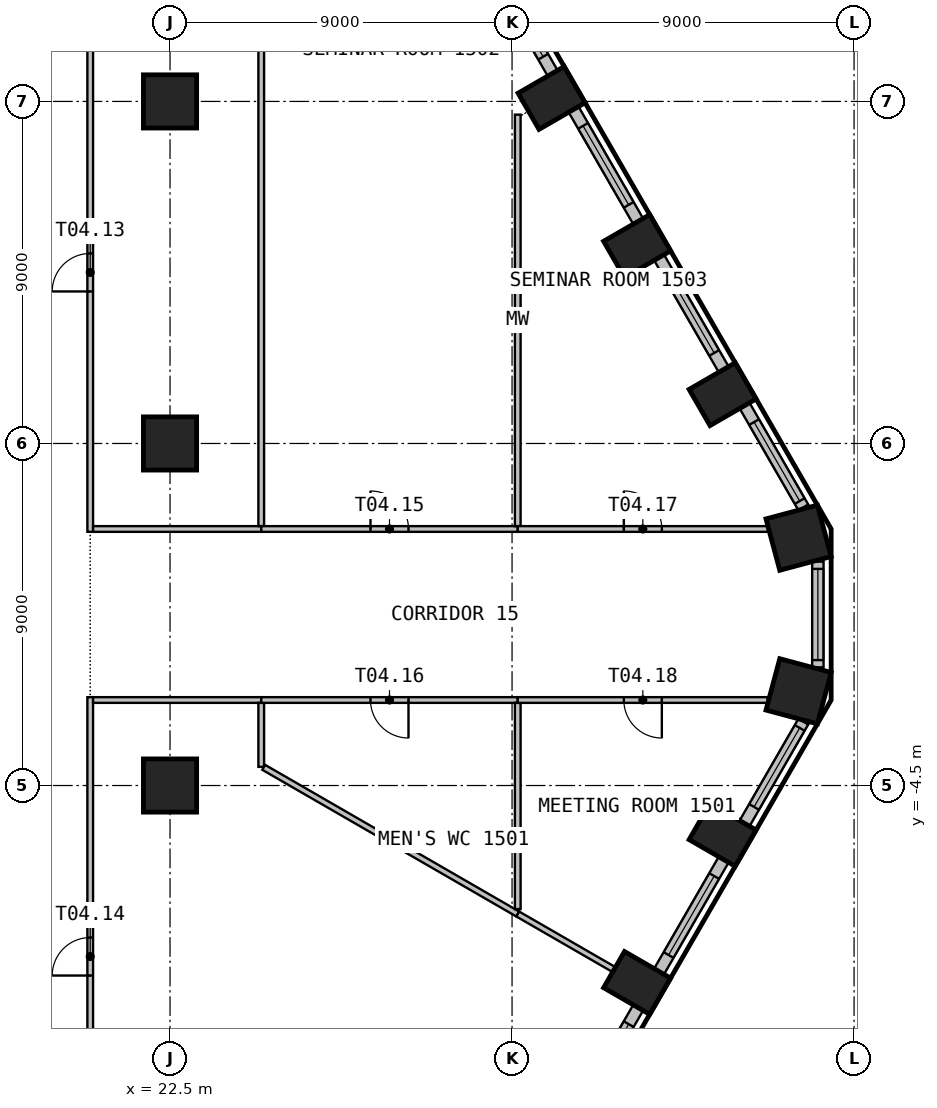
"""IFC4 building model, lengths in metres.
Left out: names, types, materials, properties, quantities, classifications, styles, units other than length and angle.
Written with IfcOpenShell. Run it as: python <this file> out.ifc"""

import sys

from ifc_helpers import new_model, si_unit, direction, frame, frame_2d, origin, origin_2d, place, context, subcontext, project, spatial, rectangle, circle, extrude, element, fill, save


model = new_model("IFC4")
c1 = context("Model", 3, precision=1e-05, world=origin(), true_north=direction((0.0, 1.0)))
c2 = subcontext(c1, "Body", "Model", "MODEL_VIEW")
j1 = project(units=[si_unit("LENGTHUNIT", "METRE"), si_unit("PLANEANGLEUNIT", "RADIAN")], contexts=[c1])
p1 = place(None, origin())
s1 = spatial("IfcSite", under=j1, at=p1, CompositionType="ELEMENT")
p2 = place(p1, origin())
s2 = spatial("IfcBuilding", under=s1, at=p2, CompositionType="ELEMENT")
p3 = place(p2, frame((0.0, 0.0, 65.1)))
s3 = spatial("IfcBuildingStorey", under=s2, at=p3, CompositionType="ELEMENT", Elevation=65.1)
for number, where, z_axis, x_axis in (
    (1, (34.791, -9.694, 0.0), (0.0, 0.0, 1.0), (0.5, 0.866, 0.0)),
    (2, (37.041, -5.797, 0.0), (0.0, 0.0, 1.0), (0.5, 0.866, 0.0)),
):
    element("IfcColumn", number, at=place(p3, frame(where, z_axis=z_axis, x_axis=x_axis)), inside=s3, PredefinedType="COLUMN", context=c2, shape_type="SweptSolid", body=[
        extrude(rectangle(XDim=1.1, YDim=1.4, at=origin_2d()), origin(), (0.0, 0.0, 1.0), 3.525),
    ])
for number, where, z_axis, x_axis in (
    (3, (39.04, -2.02, 0.0), (0.0, 0.0, 1.0), (0.259, 0.966, 0.0)),
    (4, (39.04, 2.02, 0.0), (0.0, 0.0, 1.0), (-0.259, 0.966, 0.0)),
):
    element("IfcColumn", number, at=place(p3, frame(where, z_axis=z_axis, x_axis=x_axis)), inside=s3, PredefinedType="COLUMN", context=c2, shape_type="SweptSolid", body=[
        extrude(rectangle(XDim=1.4, YDim=1.4, at=origin_2d()), origin(), (0.0, 0.0, 1.0), 3.525),
    ])
for number, where, z_axis, x_axis in (
    (5, (37.041, 5.797, 0.0), (0.0, 0.0, 1.0), (-0.5, 0.866, 0.0)),
    (6, (34.791, 9.694, 0.0), (0.0, 0.0, 1.0), (-0.5, 0.866, 0.0)),
    (7, (32.541, 13.591, 0.0), (0.0, 0.0, 1.0), (-0.5, 0.866, 0.0)),
):
    element("IfcColumn", number, at=place(p3, frame(where, z_axis=z_axis, x_axis=x_axis)), inside=s3, PredefinedType="COLUMN", context=c2, shape_type="SweptSolid", body=[
        extrude(rectangle(XDim=1.1, YDim=1.4, at=origin_2d()), origin(), (0.0, 0.0, 1.0), 3.525),
    ])
for number, where, z_axis, x_axis in (
    (8, (22.5, -4.5, 0.0), (0.0, 0.0, 1.0), (1.0, 0.0, 0.0)),
    (9, (22.5, 4.5, 0.0), (0.0, 0.0, 1.0), (1.0, 0.0, 0.0)),
    (10, (22.5, 13.5, 0.0), (0.0, 0.0, 1.0), (1.0, 0.0, 0.0)),
):
    element("IfcColumn", number, at=place(p3, frame(where, z_axis=z_axis, x_axis=x_axis)), inside=s3, PredefinedType="COLUMN", context=c2, shape_type="SweptSolid", body=[
        extrude(circle(Radius=0.7, at=origin_2d()), origin(), (0.0, 0.0, 1.0), 3.525),
    ])
p4 = place(p3, frame((33.119, -13.29, 0.0), z_axis=(0.0, 0.0, 1.0), x_axis=(0.499993955907, 0.866028893315, 0.0)))
e11 = element("IfcWall", 11, at=p4, inside=s3, PredefinedType="SOLIDWALL", context=c2, shape_type="SweptSolid", body=[
    extrude(rectangle(XDim=3.399, YDim=0.3, at=frame_2d((1.699, 0.0))), origin(), (0.0, 0.0, 1.0), 3.525),
])
p5 = place(p4, frame((0.5, 0.0, 0.9)))
e12 = element("IfcOpeningElement", 12, at=p5, cuts=e11, PredefinedType="OPENING", context=c2, shape_type="SweptSolid", body=[
    extrude(rectangle(XDim=2.4, YDim=2.1, at=frame_2d((1.2, 1.05))), frame((0.0, 0.16, 0.0), z_axis=(0.0, -1.0, 0.0), x_axis=(1.0, 0.0, 0.0)), (0.0, 0.0, 1.0), 0.32),
])
p6 = place(p3, frame((35.369, -9.393, 0.0), z_axis=(0.0, 0.0, 1.0), x_axis=(0.499993955907, 0.866028893315, 0.0)))
e13 = element("IfcWall", 13, at=p6, inside=s3, PredefinedType="SOLIDWALL", context=c2, shape_type="SweptSolid", body=[
    extrude(rectangle(XDim=3.399, YDim=0.3, at=frame_2d((1.699, 0.0))), origin(), (0.0, 0.0, 1.0), 3.525),
])
p7 = place(p6, frame((0.5, 0.0, 0.9)))
e14 = element("IfcOpeningElement", 14, at=p7, cuts=e13, PredefinedType="OPENING", context=c2, shape_type="SweptSolid", body=[
    extrude(rectangle(XDim=2.4, YDim=2.1, at=frame_2d((1.2, 1.05))), frame((0.0, 0.16, 0.0), z_axis=(0.0, -1.0, 0.0), x_axis=(1.0, 0.0, 0.0)), (0.0, 0.0, 1.0), 0.32),
])
p8 = place(p3, frame((37.619, -5.495, 0.0), z_axis=(0.0, 0.0, 1.0), x_axis=(0.49997090907, 0.866042198789, 0.0)))
e15 = element("IfcWall", 15, at=p8, inside=s3, PredefinedType="SOLIDWALL", context=c2, shape_type="SweptSolid", body=[
    extrude(rectangle(XDim=3.091, YDim=0.3, at=frame_2d((1.545, 0.0))), origin(), (0.0, 0.0, 1.0), 3.525),
])
p9 = place(p8, frame((0.5, 0.0, 0.9)))
e16 = element("IfcOpeningElement", 16, at=p9, cuts=e15, PredefinedType="OPENING", context=c2, shape_type="SweptSolid", body=[
    extrude(rectangle(XDim=2.4, YDim=2.1, at=frame_2d((1.2, 1.05))), frame((0.0, 0.16, 0.0), z_axis=(0.0, -1.0, 0.0), x_axis=(1.0, 0.0, 0.0)), (0.0, 0.0, 1.0), 0.32),
])
p10 = place(p3, frame((39.547, -1.391, 0.0), z_axis=(0.0, 0.0, 1.0), x_axis=(0.0, 1.0, 0.0)))
e17 = element("IfcWall", 17, at=p10, inside=s3, PredefinedType="SOLIDWALL", context=c2, shape_type="SweptSolid", body=[
    extrude(rectangle(XDim=2.782, YDim=0.3, at=frame_2d((1.391, 0.0))), origin(), (0.0, 0.0, 1.0), 3.525),
])
p11 = place(p10, frame((0.191, 0.0, 0.9)))
e18 = element("IfcOpeningElement", 18, at=p11, cuts=e17, PredefinedType="OPENING", context=c2, shape_type="SweptSolid", body=[
    extrude(rectangle(XDim=2.4, YDim=2.1, at=frame_2d((1.2, 1.05))), frame((0.0, 0.16, 0.0), z_axis=(0.0, -1.0, 0.0), x_axis=(1.0, 0.0, 0.0)), (0.0, 0.0, 1.0), 0.32),
])
p12 = place(p3, frame((39.165, 2.819, 0.0), z_axis=(0.0, 0.0, 1.0), x_axis=(-0.49997090907, 0.866042198789, 0.0)))
e19 = element("IfcWall", 19, at=p12, inside=s3, PredefinedType="SOLIDWALL", context=c2, shape_type="SweptSolid", body=[
    extrude(rectangle(XDim=3.091, YDim=0.3, at=frame_2d((1.545, 0.0))), origin(), (0.0, 0.0, 1.0), 3.525),
])
p13 = place(p12, frame((0.191, 0.0, 0.9)))
e20 = element("IfcOpeningElement", 20, at=p13, cuts=e19, PredefinedType="OPENING", context=c2, shape_type="SweptSolid", body=[
    extrude(rectangle(XDim=2.4, YDim=2.1, at=frame_2d((1.2, 1.05))), frame((0.0, 0.16, 0.0), z_axis=(0.0, -1.0, 0.0), x_axis=(1.0, 0.0, 0.0)), (0.0, 0.0, 1.0), 0.32),
])
p14 = place(p3, frame((37.069, 6.449, 0.0), z_axis=(0.0, 0.0, 1.0), x_axis=(-0.499993955907, 0.866028893315, 0.0)))
e21 = element("IfcWall", 21, at=p14, inside=s3, PredefinedType="SOLIDWALL", context=c2, shape_type="SweptSolid", body=[
    extrude(rectangle(XDim=3.399, YDim=0.3, at=frame_2d((1.699, 0.0))), origin(), (0.0, 0.0, 1.0), 3.525),
])
p15 = place(p14, frame((0.5, 0.0, 0.9)))
e22 = element("IfcOpeningElement", 22, at=p15, cuts=e21, PredefinedType="OPENING", context=c2, shape_type="SweptSolid", body=[
    extrude(rectangle(XDim=2.4, YDim=2.1, at=frame_2d((1.2, 1.05))), frame((0.0, 0.16, 0.0), z_axis=(0.0, -1.0, 0.0), x_axis=(1.0, 0.0, 0.0)), (0.0, 0.0, 1.0), 0.32),
])
p16 = place(p3, frame((34.819, 10.346, 0.0), z_axis=(0.0, 0.0, 1.0), x_axis=(-0.499993955907, 0.866028893315, 0.0)))
e23 = element("IfcWall", 23, at=p16, inside=s3, PredefinedType="SOLIDWALL", context=c2, shape_type="SweptSolid", body=[
    extrude(rectangle(XDim=3.399, YDim=0.3, at=frame_2d((1.699, 0.0))), origin(), (0.0, 0.0, 1.0), 3.525),
])
p17 = place(p16, frame((0.5, 0.0, 0.9)))
e24 = element("IfcOpeningElement", 24, at=p17, cuts=e23, PredefinedType="OPENING", context=c2, shape_type="SweptSolid", body=[
    extrude(rectangle(XDim=2.4, YDim=2.1, at=frame_2d((1.2, 1.05))), frame((0.0, 0.16, 0.0), z_axis=(0.0, -1.0, 0.0), x_axis=(1.0, 0.0, 0.0)), (0.0, 0.0, 1.0), 0.32),
])
p18 = place(p3, frame((32.569, 14.243, 0.0), z_axis=(0.0, 0.0, 1.0), x_axis=(-0.499993955907, 0.866028893315, 0.0)))
e25 = element("IfcWall", 25, at=p18, inside=s3, PredefinedType="SOLIDWALL", context=c2, shape_type="SweptSolid", body=[
    extrude(rectangle(XDim=3.399, YDim=0.3, at=frame_2d((1.699, 0.0))), origin(), (0.0, 0.0, 1.0), 3.525),
])
p19 = place(p18, frame((0.5, 0.0, 0.9)))
e26 = element("IfcOpeningElement", 26, at=p19, cuts=e25, PredefinedType="OPENING", context=c2, shape_type="SweptSolid", body=[
    extrude(rectangle(XDim=2.4, YDim=2.1, at=frame_2d((1.2, 1.05))), frame((0.0, 0.16, 0.0), z_axis=(0.0, -1.0, 0.0), x_axis=(1.0, 0.0, 0.0)), (0.0, 0.0, 1.0), 0.32),
])
p20 = place(p3, frame((20.4, -15.825, 0.0), z_axis=(0.0, 0.0, 1.0), x_axis=(0.0, 1.0, 0.0)))
e27 = element("IfcWall", 27, at=p20, inside=s3, PredefinedType="PARTITIONING", context=c2, shape_type="SweptSolid", body=[
    extrude(rectangle(XDim=13.65, YDim=0.15, at=frame_2d((6.825, 0.0))), origin(), (0.0, 0.0, 1.0), 3.525),
])
p21 = place(p20, frame((6.325, 0.0, 0.0)))
e28 = element("IfcOpeningElement", 28, at=p21, cuts=e27, PredefinedType="OPENING", context=c2, shape_type="SweptSolid", body=[
    extrude(rectangle(XDim=1.0, YDim=2.1, at=frame_2d((0.5, 1.05))), frame((0.0, 0.085, 0.0), z_axis=(0.0, -1.0, 0.0), x_axis=(1.0, 0.0, 0.0)), (0.0, 0.0, 1.0), 0.17),
])
p22 = place(p3, frame((24.9, -2.25, 0.0), z_axis=(0.0, 0.0, 1.0), x_axis=(-1.0, 0.0, 0.0)))
e29 = element("IfcWall", 29, at=p22, inside=s3, PredefinedType="PARTITIONING", context=c2, shape_type="SweptSolid", body=[
    extrude(rectangle(XDim=4.425, YDim=0.15, at=frame_2d((2.212, 0.0))), origin(), (0.0, 0.0, 1.0), 3.525),
])
p23 = place(p3, frame((20.4, 2.175, 0.0), z_axis=(0.0, 0.0, 1.0), x_axis=(0.0, 1.0, 0.0)))
e30 = element("IfcWall", 30, at=p23, inside=s3, PredefinedType="PARTITIONING", context=c2, shape_type="SweptSolid", body=[
    extrude(rectangle(XDim=13.65, YDim=0.15, at=frame_2d((6.825, 0.0))), origin(), (0.0, 0.0, 1.0), 3.525),
])
p24 = place(p23, frame((6.325, 0.0, 0.0)))
e31 = element("IfcOpeningElement", 31, at=p24, cuts=e30, PredefinedType="OPENING", context=c2, shape_type="SweptSolid", body=[
    extrude(rectangle(XDim=1.0, YDim=2.1, at=frame_2d((0.5, 1.05))), frame((0.0, 0.085, 0.0), z_axis=(0.0, -1.0, 0.0), x_axis=(1.0, 0.0, 0.0)), (0.0, 0.0, 1.0), 0.17),
])
p25 = place(p3, frame((20.475, 2.25, 0.0), z_axis=(0.0, 0.0, 1.0), x_axis=(1.0, 0.0, 0.0)))
e32 = element("IfcWall", 32, at=p25, inside=s3, PredefinedType="PARTITIONING", context=c2, shape_type="SweptSolid", body=[
    extrude(rectangle(XDim=4.425, YDim=0.15, at=frame_2d((2.212, 0.0))), origin(), (0.0, 0.0, 1.0), 3.525),
])
p26 = place(p3, frame((24.9, -2.325, 0.0), z_axis=(0.0, 0.0, 1.0), x_axis=(0.0, -1.0, 0.0)))
e33 = element("IfcWall", 33, at=p26, inside=s3, PredefinedType="PARTITIONING", context=c2, shape_type="SweptSolid", body=[
    extrude(rectangle(XDim=1.684, YDim=0.15, at=frame_2d((0.842, 0.0))), origin(), (0.0, 0.0, 1.0), 3.525),
])
p27 = place(p3, frame((24.965, -4.021, 0.0), z_axis=(0.0, 0.0, 1.0), x_axis=(0.866017566024, -0.500013575153, 0.0)))
e34 = element("IfcWall", 34, at=p27, inside=s3, PredefinedType="PARTITIONING", context=c2, shape_type="SweptSolid", body=[
    extrude(rectangle(XDim=7.719, YDim=0.15, at=frame_2d((3.859, 0.0))), origin(), (0.0, 0.0, 1.0), 3.525),
])
p28 = place(p3, frame((31.65, -2.25, 0.0), z_axis=(0.0, 0.0, 1.0), x_axis=(-1.0, 0.0, 0.0)))
e35 = element("IfcWall", 35, at=p28, inside=s3, PredefinedType="PARTITIONING", context=c2, shape_type="SweptSolid", body=[
    extrude(rectangle(XDim=6.75, YDim=0.15, at=frame_2d((3.375, 0.0))), origin(), (0.0, 0.0, 1.0), 3.525),
])
p29 = place(p28, frame((2.875, 0.0, 0.0)))
e36 = element("IfcOpeningElement", 36, at=p29, cuts=e35, PredefinedType="OPENING", context=c2, shape_type="SweptSolid", body=[
    extrude(rectangle(XDim=1.0, YDim=2.1, at=frame_2d((0.5, 1.05))), frame((0.0, 0.085, 0.0), z_axis=(0.0, -1.0, 0.0), x_axis=(1.0, 0.0, 0.0)), (0.0, 0.0, 1.0), 0.17),
])
p30 = place(p3, frame((24.9, 24.843, 0.0), z_axis=(0.0, 0.0, 1.0), x_axis=(0.0, -1.0, 0.0)))
e37 = element("IfcWall", 37, at=p30, inside=s3, PredefinedType="PARTITIONING", context=c2, shape_type="SweptSolid", body=[
    extrude(rectangle(XDim=22.518, YDim=0.15, at=frame_2d((11.259, 0.0))), origin(), (0.0, 0.0, 1.0), 3.525),
])
p31 = place(p3, frame((24.9, 2.25, 0.0), z_axis=(0.0, 0.0, 1.0), x_axis=(1.0, 0.0, 0.0)))
e38 = element("IfcWall", 38, at=p31, inside=s3, PredefinedType="PARTITIONING", context=c2, shape_type="SweptSolid", body=[
    extrude(rectangle(XDim=6.75, YDim=0.15, at=frame_2d((3.375, 0.0))), origin(), (0.0, 0.0, 1.0), 3.525),
])
p32 = place(p31, frame((2.875, 0.0, 0.0)))
e39 = element("IfcOpeningElement", 39, at=p32, cuts=e38, PredefinedType="OPENING", context=c2, shape_type="SweptSolid", body=[
    extrude(rectangle(XDim=1.0, YDim=2.1, at=frame_2d((0.5, 1.05))), frame((0.0, 0.085, 0.0), z_axis=(0.0, -1.0, 0.0), x_axis=(1.0, 0.0, 0.0)), (0.0, 0.0, 1.0), 0.17),
])
p33 = place(p3, frame((31.65, -2.325, 0.0), z_axis=(0.0, 0.0, 1.0), x_axis=(0.0, -1.0, 0.0)))
e40 = element("IfcWall", 40, at=p33, inside=s3, PredefinedType="PARTITIONING", context=c2, shape_type="SweptSolid", body=[
    extrude(rectangle(XDim=5.426, YDim=0.15, at=frame_2d((2.713, 0.0))), origin(), (0.0, 0.0, 1.0), 3.525),
])
p34 = place(p3, frame((31.65, -7.881, 0.0), z_axis=(0.0, 0.0, 1.0), x_axis=(0.866063904005, -0.499933309731, 0.0)))
e41 = element("IfcWall", 41, at=p34, inside=s3, PredefinedType="PARTITIONING", context=c2, shape_type="SweptSolid", body=[
    extrude(rectangle(XDim=2.907, YDim=0.15, at=frame_2d((1.453, 0.0))), origin(), (0.0, 0.0, 1.0), 3.525),
])
p35 = place(p3, frame((38.233, -2.25, 0.0), z_axis=(0.0, 0.0, 1.0), x_axis=(-1.0, 0.0, 0.0)))
e42 = element("IfcWall", 42, at=p35, inside=s3, PredefinedType="PARTITIONING", context=c2, shape_type="SweptSolid", body=[
    extrude(rectangle(XDim=6.583, YDim=0.15, at=frame_2d((3.292, 0.0))), origin(), (0.0, 0.0, 1.0), 3.525),
])
p36 = place(p35, frame((2.792, 0.0, 0.0)))
e43 = element("IfcOpeningElement", 43, at=p36, cuts=e42, PredefinedType="OPENING", context=c2, shape_type="SweptSolid", body=[
    extrude(rectangle(XDim=1.0, YDim=2.1, at=frame_2d((0.5, 1.05))), frame((0.0, 0.085, 0.0), z_axis=(0.0, -1.0, 0.0), x_axis=(1.0, 0.0, 0.0)), (0.0, 0.0, 1.0), 0.17),
])
p37 = place(p3, frame((31.65, 13.152, 0.0), z_axis=(0.0, 0.0, 1.0), x_axis=(0.0, -1.0, 0.0)))
e44 = element("IfcWall", 44, at=p37, inside=s3, PredefinedType="MOVABLE", context=c2, shape_type="SweptSolid", body=[
    extrude(rectangle(XDim=10.827, YDim=0.15, at=frame_2d((5.414, 0.0))), origin(), (0.0, 0.0, 1.0), 3.525),
])
p38 = place(p3, frame((31.65, 2.25, 0.0), z_axis=(0.0, 0.0, 1.0), x_axis=(1.0, 0.0, 0.0)))
e45 = element("IfcWall", 45, at=p38, inside=s3, PredefinedType="PARTITIONING", context=c2, shape_type="SweptSolid", body=[
    extrude(rectangle(XDim=6.583, YDim=0.15, at=frame_2d((3.292, 0.0))), origin(), (0.0, 0.0, 1.0), 3.525),
])
p39 = place(p38, frame((2.792, 0.0, 0.0)))
e46 = element("IfcOpeningElement", 46, at=p39, cuts=e45, PredefinedType="OPENING", context=c2, shape_type="SweptSolid", body=[
    extrude(rectangle(XDim=1.0, YDim=2.1, at=frame_2d((0.5, 1.05))), frame((0.0, 0.085, 0.0), z_axis=(0.0, -1.0, 0.0), x_axis=(1.0, 0.0, 0.0)), (0.0, 0.0, 1.0), 0.17),
])
p40 = place(p5, origin())
e47 = element("IfcWindow", 47, at=p40, inside=s3, PartitioningType="SINGLE_PANEL", PredefinedType="WINDOW", context=c2, shape_type="SweptSolid", body=[
    extrude(rectangle(XDim=2.4, YDim=2.1, at=frame_2d((1.2, 1.05))), frame((0.0, 0.03, 0.0), z_axis=(0.0, -1.0, 0.0), x_axis=(1.0, 0.0, 0.0)), (0.0, 0.0, 1.0), 0.06),
])
fill(e12, e47)
p41 = place(p7, origin())
e48 = element("IfcWindow", 48, at=p41, inside=s3, PartitioningType="SINGLE_PANEL", PredefinedType="WINDOW", context=c2, shape_type="SweptSolid", body=[
    extrude(rectangle(XDim=2.4, YDim=2.1, at=frame_2d((1.2, 1.05))), frame((0.0, 0.03, 0.0), z_axis=(0.0, -1.0, 0.0), x_axis=(1.0, 0.0, 0.0)), (0.0, 0.0, 1.0), 0.06),
])
fill(e14, e48)
p42 = place(p9, origin())
e49 = element("IfcWindow", 49, at=p42, inside=s3, PartitioningType="SINGLE_PANEL", PredefinedType="WINDOW", context=c2, shape_type="SweptSolid", body=[
    extrude(rectangle(XDim=2.4, YDim=2.1, at=frame_2d((1.2, 1.05))), frame((0.0, 0.03, 0.0), z_axis=(0.0, -1.0, 0.0), x_axis=(1.0, 0.0, 0.0)), (0.0, 0.0, 1.0), 0.06),
])
fill(e16, e49)
p43 = place(p11, origin())
e50 = element("IfcWindow", 50, at=p43, inside=s3, PartitioningType="SINGLE_PANEL", PredefinedType="WINDOW", context=c2, shape_type="SweptSolid", body=[
    extrude(rectangle(XDim=2.4, YDim=2.1, at=frame_2d((1.2, 1.05))), frame((0.0, 0.03, 0.0), z_axis=(0.0, -1.0, 0.0), x_axis=(1.0, 0.0, 0.0)), (0.0, 0.0, 1.0), 0.06),
])
fill(e18, e50)
p44 = place(p13, origin())
e51 = element("IfcWindow", 51, at=p44, inside=s3, PartitioningType="SINGLE_PANEL", PredefinedType="WINDOW", context=c2, shape_type="SweptSolid", body=[
    extrude(rectangle(XDim=2.4, YDim=2.1, at=frame_2d((1.2, 1.05))), frame((0.0, 0.03, 0.0), z_axis=(0.0, -1.0, 0.0), x_axis=(1.0, 0.0, 0.0)), (0.0, 0.0, 1.0), 0.06),
])
fill(e20, e51)
p45 = place(p15, origin())
e52 = element("IfcWindow", 52, at=p45, inside=s3, PartitioningType="SINGLE_PANEL", PredefinedType="WINDOW", context=c2, shape_type="SweptSolid", body=[
    extrude(rectangle(XDim=2.4, YDim=2.1, at=frame_2d((1.2, 1.05))), frame((0.0, 0.03, 0.0), z_axis=(0.0, -1.0, 0.0), x_axis=(1.0, 0.0, 0.0)), (0.0, 0.0, 1.0), 0.06),
])
fill(e22, e52)
p46 = place(p17, origin())
e53 = element("IfcWindow", 53, at=p46, inside=s3, PartitioningType="SINGLE_PANEL", PredefinedType="WINDOW", context=c2, shape_type="SweptSolid", body=[
    extrude(rectangle(XDim=2.4, YDim=2.1, at=frame_2d((1.2, 1.05))), frame((0.0, 0.03, 0.0), z_axis=(0.0, -1.0, 0.0), x_axis=(1.0, 0.0, 0.0)), (0.0, 0.0, 1.0), 0.06),
])
fill(e24, e53)
p47 = place(p19, origin())
e54 = element("IfcWindow", 54, at=p47, inside=s3, PartitioningType="SINGLE_PANEL", PredefinedType="WINDOW", context=c2, shape_type="SweptSolid", body=[
    extrude(rectangle(XDim=2.4, YDim=2.1, at=frame_2d((1.2, 1.05))), frame((0.0, 0.03, 0.0), z_axis=(0.0, -1.0, 0.0), x_axis=(1.0, 0.0, 0.0)), (0.0, 0.0, 1.0), 0.06),
])
fill(e26, e54)
p48 = place(p24, origin())
e55 = element("IfcDoor", 55, at=p48, inside=s3, OperationType="SINGLE_SWING_LEFT", PredefinedType="DOOR", context=c2, shape_type="SweptSolid", body=[
    extrude(rectangle(XDim=1.0, YDim=2.1, at=frame_2d((0.5, 1.05))), frame((0.0, 0.025, 0.0), z_axis=(0.0, -1.0, 0.0), x_axis=(1.0, 0.0, 0.0)), (0.0, 0.0, 1.0), 0.05),
])
fill(e31, e55)
p49 = place(p21, origin())
e56 = element("IfcDoor", 56, at=p49, inside=s3, OperationType="SINGLE_SWING_RIGHT", PredefinedType="DOOR", context=c2, shape_type="SweptSolid", body=[
    extrude(rectangle(XDim=1.0, YDim=2.1, at=frame_2d((0.5, 1.05))), frame((0.0, 0.025, 0.0), z_axis=(0.0, -1.0, 0.0), x_axis=(1.0, 0.0, 0.0)), (0.0, 0.0, 1.0), 0.05),
])
fill(e28, e56)
p50 = place(p32, origin())
e57 = element("IfcDoor", 57, at=p50, inside=s3, OperationType="SINGLE_SWING_RIGHT", PredefinedType="DOOR", context=c2, shape_type="SweptSolid", body=[
    extrude(rectangle(XDim=1.0, YDim=2.1, at=frame_2d((0.5, 1.05))), frame((0.0, 0.025, 0.0), z_axis=(0.0, -1.0, 0.0), x_axis=(1.0, 0.0, 0.0)), (0.0, 0.0, 1.0), 0.05),
])
fill(e39, e57)
p51 = place(p29, origin())
e58 = element("IfcDoor", 58, at=p51, inside=s3, OperationType="SINGLE_SWING_LEFT", PredefinedType="DOOR", context=c2, shape_type="SweptSolid", body=[
    extrude(rectangle(XDim=1.0, YDim=2.1, at=frame_2d((0.5, 1.05))), frame((0.0, 0.025, 0.0), z_axis=(0.0, -1.0, 0.0), x_axis=(1.0, 0.0, 0.0)), (0.0, 0.0, 1.0), 0.05),
])
fill(e36, e58)
p52 = place(p39, origin())
e59 = element("IfcDoor", 59, at=p52, inside=s3, OperationType="SINGLE_SWING_RIGHT", PredefinedType="DOOR", context=c2, shape_type="SweptSolid", body=[
    extrude(rectangle(XDim=1.0, YDim=2.1, at=frame_2d((0.5, 1.05))), frame((0.0, 0.025, 0.0), z_axis=(0.0, -1.0, 0.0), x_axis=(1.0, 0.0, 0.0)), (0.0, 0.0, 1.0), 0.05),
])
fill(e46, e59)
p53 = place(p36, origin())
e60 = element("IfcDoor", 60, at=p53, inside=s3, OperationType="SINGLE_SWING_LEFT", PredefinedType="DOOR", context=c2, shape_type="SweptSolid", body=[
    extrude(rectangle(XDim=1.0, YDim=2.1, at=frame_2d((0.5, 1.05))), frame((0.0, 0.025, 0.0), z_axis=(0.0, -1.0, 0.0), x_axis=(1.0, 0.0, 0.0)), (0.0, 0.0, 1.0), 0.05),
])
fill(e43, e60)
save(model, sys.argv[1])
